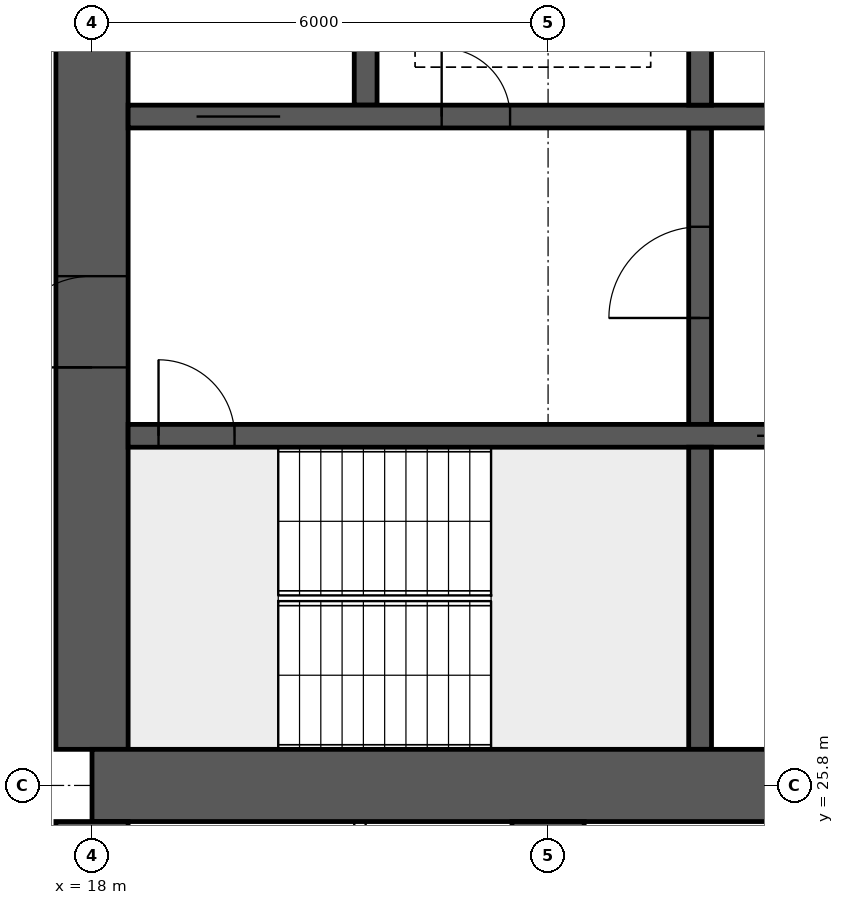
"""IFC4 building model, lengths in metres.
Left out: names, types, materials, properties, quantities, classifications, styles, units other than length and angle.
Written with IfcOpenShell. Run it as: python <this file> out.ifc"""

import sys

from ifc_helpers import new_model, si_unit, direction, frame, frame_2d, origin, place, context, subcontext, project, spatial, rectangle, extrude, element, fill, save


model = new_model("IFC4")
c1 = context("Model", 3, precision=1e-05, world=origin(), true_north=direction((0.0, 1.0)))
c2 = subcontext(c1, "Body", "Model", "MODEL_VIEW")
j1 = project(units=[si_unit("LENGTHUNIT", "METRE"), si_unit("PLANEANGLEUNIT", "RADIAN")], contexts=[c1])
p1 = place(None, origin())
s1 = spatial("IfcSite", under=j1, at=p1, CompositionType="ELEMENT")
p2 = place(p1, origin())
s2 = spatial("IfcBuilding", under=s1, at=p2, CompositionType="ELEMENT")
p3 = place(p2, frame((0.0, 0.0, 91.9)))
s3 = spatial("IfcBuildingStorey", under=s2, at=p3, CompositionType="ELEMENT", Elevation=91.9)
p4 = place(p3, frame((18.0, 25.8, 0.0), z_axis=(0.0, 0.0, 1.0), x_axis=(1.0, 0.0, 0.0)))
e1 = element("IfcWall", 1, at=p4, inside=s3, PredefinedType="SHEAR", context=c2, shape_type="SweptSolid", body=[
    extrude(rectangle(XDim=48.0, YDim=0.95, at=frame_2d((24.0, 0.0))), origin(), (0.0, 0.0, 1.0), 3.75),
])
p5 = place(p3, frame((18.0, 26.275, 0.0), z_axis=(0.0, 0.0, 1.0), x_axis=(0.0, 1.0, 0.0)))
e2 = element("IfcWall", 2, at=p5, inside=s3, PredefinedType="SHEAR", context=c2, shape_type="SweptSolid", body=[
    extrude(rectangle(XDim=11.45, YDim=0.95, at=frame_2d((5.725, 0.0))), origin(), (0.0, 0.0, 1.0), 3.75),
])
p6 = place(p5, frame((5.025, 0.0, 0.0)))
e3 = element("IfcOpeningElement", 3, at=p6, cuts=e2, PredefinedType="OPENING", context=c2, shape_type="SweptSolid", body=[
    extrude(rectangle(XDim=1.2, YDim=2.1, at=frame_2d((0.6, 1.05))), frame((0.0, 0.485, 0.0), z_axis=(0.0, -1.0, 0.0), x_axis=(1.0, 0.0, 0.0)), (0.0, 0.0, 1.0), 0.97),
])
p7 = place(p3, frame((18.475, 30.4, 0.0), z_axis=(0.0, 0.0, 1.0), x_axis=(1.0, 0.0, 0.0)))
e4 = element("IfcWall", 4, at=p7, inside=s3, PredefinedType="SHEAR", context=c2, shape_type="SweptSolid", body=[
    extrude(rectangle(XDim=47.05, YDim=0.3, at=frame_2d((23.525, 0.0))), origin(), (0.0, 0.0, 1.0), 3.75),
])
p8 = place(p7, frame((0.4, 0.0, 0.0)))
e5 = element("IfcOpeningElement", 5, at=p8, cuts=e4, PredefinedType="OPENING", context=c2, shape_type="SweptSolid", body=[
    extrude(rectangle(XDim=1.0, YDim=2.1, at=frame_2d((0.5, 1.05))), frame((0.0, 0.16, 0.0), z_axis=(0.0, -1.0, 0.0), x_axis=(1.0, 0.0, 0.0)), (0.0, 0.0, 1.0), 0.32),
])
p9 = place(p7, frame((45.65, 0.0, 0.0)))
e6 = element("IfcOpeningElement", 6, at=p9, cuts=e4, PredefinedType="OPENING", context=c2, shape_type="SweptSolid", body=[
    extrude(rectangle(XDim=1.0, YDim=2.1, at=frame_2d((0.5, 1.05))), frame((0.0, 0.16, 0.0), z_axis=(0.0, -1.0, 0.0), x_axis=(1.0, 0.0, 0.0)), (0.0, 0.0, 1.0), 0.32),
])
p10 = place(p7, frame((8.275, 0.0, 0.0)))
e7 = element("IfcOpeningElement", 7, at=p10, cuts=e4, PredefinedType="OPENING", context=c2, shape_type="SweptSolid", body=[
    extrude(rectangle(XDim=1.1, YDim=2.1, at=frame_2d((0.55, 1.05))), frame((0.0, 0.16, 0.0), z_axis=(0.0, -1.0, 0.0), x_axis=(1.0, 0.0, 0.0)), (0.0, 0.0, 1.0), 0.32),
])
p11 = place(p7, frame((10.875, 0.0, 0.0)))
e8 = element("IfcOpeningElement", 8, at=p11, cuts=e4, PredefinedType="OPENING", context=c2, shape_type="SweptSolid", body=[
    extrude(rectangle(XDim=1.1, YDim=2.1, at=frame_2d((0.55, 1.05))), frame((0.0, 0.16, 0.0), z_axis=(0.0, -1.0, 0.0), x_axis=(1.0, 0.0, 0.0)), (0.0, 0.0, 1.0), 0.32),
])
p12 = place(p7, frame((13.475, 0.0, 0.0)))
e9 = element("IfcOpeningElement", 9, at=p12, cuts=e4, PredefinedType="OPENING", context=c2, shape_type="SweptSolid", body=[
    extrude(rectangle(XDim=1.1, YDim=2.1, at=frame_2d((0.55, 1.05))), frame((0.0, 0.16, 0.0), z_axis=(0.0, -1.0, 0.0), x_axis=(1.0, 0.0, 0.0)), (0.0, 0.0, 1.0), 0.32),
])
p13 = place(p7, frame((16.075, 0.0, 0.0)))
e10 = element("IfcOpeningElement", 10, at=p13, cuts=e4, PredefinedType="OPENING", context=c2, shape_type="SweptSolid", body=[
    extrude(rectangle(XDim=1.1, YDim=2.1, at=frame_2d((0.55, 1.05))), frame((0.0, 0.16, 0.0), z_axis=(0.0, -1.0, 0.0), x_axis=(1.0, 0.0, 0.0)), (0.0, 0.0, 1.0), 0.32),
])
p14 = place(p7, frame((18.85, 0.0, 0.0)))
e11 = element("IfcOpeningElement", 11, at=p14, cuts=e4, PredefinedType="OPENING", context=c2, shape_type="SweptSolid", body=[
    extrude(rectangle(XDim=0.9, YDim=2.1, at=frame_2d((0.45, 1.05))), frame((0.0, 0.16, 0.0), z_axis=(0.0, -1.0, 0.0), x_axis=(1.0, 0.0, 0.0)), (0.0, 0.0, 1.0), 0.32),
])
p15 = place(p7, frame((30.142, 0.0, 0.0)))
e12 = element("IfcOpeningElement", 12, at=p15, cuts=e4, PredefinedType="OPENING", context=c2, shape_type="SweptSolid", body=[
    extrude(rectangle(XDim=1.1, YDim=2.1, at=frame_2d((0.55, 1.05))), frame((0.0, 0.16, 0.0), z_axis=(0.0, -1.0, 0.0), x_axis=(1.0, 0.0, 0.0)), (0.0, 0.0, 1.0), 0.32),
])
p16 = place(p7, frame((33.675, 0.0, 0.0)))
e13 = element("IfcOpeningElement", 13, at=p16, cuts=e4, PredefinedType="OPENING", context=c2, shape_type="SweptSolid", body=[
    extrude(rectangle(XDim=1.1, YDim=2.1, at=frame_2d((0.55, 1.05))), frame((0.0, 0.16, 0.0), z_axis=(0.0, -1.0, 0.0), x_axis=(1.0, 0.0, 0.0)), (0.0, 0.0, 1.0), 0.32),
])
p17 = place(p7, frame((37.208, 0.0, 0.0)))
e14 = element("IfcOpeningElement", 14, at=p17, cuts=e4, PredefinedType="OPENING", context=c2, shape_type="SweptSolid", body=[
    extrude(rectangle(XDim=1.1, YDim=2.1, at=frame_2d((0.55, 1.05))), frame((0.0, 0.16, 0.0), z_axis=(0.0, -1.0, 0.0), x_axis=(1.0, 0.0, 0.0)), (0.0, 0.0, 1.0), 0.32),
])
p18 = place(p3, frame((18.475, 34.6, 0.0), z_axis=(0.0, 0.0, 1.0), x_axis=(1.0, 0.0, 0.0)))
e15 = element("IfcWall", 15, at=p18, inside=s3, PredefinedType="SHEAR", context=c2, shape_type="SweptSolid", body=[
    extrude(rectangle(XDim=47.05, YDim=0.3, at=frame_2d((23.525, 0.0))), origin(), (0.0, 0.0, 1.0), 3.75),
])
p19 = place(p18, frame((0.9, 0.0, 0.0)))
e16 = element("IfcOpeningElement", 16, at=p19, cuts=e15, PredefinedType="OPENING", context=c2, shape_type="SweptSolid", body=[
    extrude(rectangle(XDim=1.1, YDim=2.1, at=frame_2d((0.55, 1.05))), frame((0.0, 0.16, 0.0), z_axis=(0.0, -1.0, 0.0), x_axis=(1.0, 0.0, 0.0)), (0.0, 0.0, 1.0), 0.32),
])
p20 = place(p18, frame((45.05, 0.0, 0.0)))
e17 = element("IfcOpeningElement", 17, at=p20, cuts=e15, PredefinedType="OPENING", context=c2, shape_type="SweptSolid", body=[
    extrude(rectangle(XDim=1.1, YDim=2.1, at=frame_2d((0.55, 1.05))), frame((0.0, 0.16, 0.0), z_axis=(0.0, -1.0, 0.0), x_axis=(1.0, 0.0, 0.0)), (0.0, 0.0, 1.0), 0.32),
])
p21 = place(p18, frame((4.125, 0.0, 0.0)))
e18 = element("IfcOpeningElement", 18, at=p21, cuts=e15, PredefinedType="OPENING", context=c2, shape_type="SweptSolid", body=[
    extrude(rectangle(XDim=0.9, YDim=2.1, at=frame_2d((0.45, 1.05))), frame((0.0, 0.16, 0.0), z_axis=(0.0, -1.0, 0.0), x_axis=(1.0, 0.0, 0.0)), (0.0, 0.0, 1.0), 0.32),
])
p22 = place(p18, frame((42.025, 0.0, 0.0)))
e19 = element("IfcOpeningElement", 19, at=p22, cuts=e15, PredefinedType="OPENING", context=c2, shape_type="SweptSolid", body=[
    extrude(rectangle(XDim=0.9, YDim=2.1, at=frame_2d((0.45, 1.05))), frame((0.0, 0.16, 0.0), z_axis=(0.0, -1.0, 0.0), x_axis=(1.0, 0.0, 0.0)), (0.0, 0.0, 1.0), 0.32),
])
p23 = place(p18, frame((8.9, 0.0, 0.0)))
e20 = element("IfcOpeningElement", 20, at=p23, cuts=e15, PredefinedType="OPENING", context=c2, shape_type="SweptSolid", body=[
    extrude(rectangle(XDim=0.9, YDim=2.1, at=frame_2d((0.45, 1.05))), frame((0.0, 0.16, 0.0), z_axis=(0.0, -1.0, 0.0), x_axis=(1.0, 0.0, 0.0)), (0.0, 0.0, 1.0), 0.32),
])
p24 = place(p18, frame((12.874, 0.0, 0.0)))
e21 = element("IfcOpeningElement", 21, at=p24, cuts=e15, PredefinedType="OPENING", context=c2, shape_type="SweptSolid", body=[
    extrude(rectangle(XDim=0.9, YDim=2.1, at=frame_2d((0.45, 1.05))), frame((0.0, 0.16, 0.0), z_axis=(0.0, -1.0, 0.0), x_axis=(1.0, 0.0, 0.0)), (0.0, 0.0, 1.0), 0.32),
])
p25 = place(p18, frame((16.521, 0.0, 0.0)))
e22 = element("IfcOpeningElement", 22, at=p25, cuts=e15, PredefinedType="OPENING", context=c2, shape_type="SweptSolid", body=[
    extrude(rectangle(XDim=0.9, YDim=2.1, at=frame_2d((0.45, 1.05))), frame((0.0, 0.16, 0.0), z_axis=(0.0, -1.0, 0.0), x_axis=(1.0, 0.0, 0.0)), (0.0, 0.0, 1.0), 0.32),
])
p26 = place(p18, frame((20.28, 0.0, 0.0)))
e23 = element("IfcOpeningElement", 23, at=p26, cuts=e15, PredefinedType="OPENING", context=c2, shape_type="SweptSolid", body=[
    extrude(rectangle(XDim=0.9, YDim=2.1, at=frame_2d((0.45, 1.05))), frame((0.0, 0.16, 0.0), z_axis=(0.0, -1.0, 0.0), x_axis=(1.0, 0.0, 0.0)), (0.0, 0.0, 1.0), 0.32),
])
p27 = place(p18, frame((24.686, 0.0, 0.0)))
e24 = element("IfcOpeningElement", 24, at=p27, cuts=e15, PredefinedType="OPENING", context=c2, shape_type="SweptSolid", body=[
    extrude(rectangle(XDim=0.9, YDim=2.1, at=frame_2d((0.45, 1.05))), frame((0.0, 0.16, 0.0), z_axis=(0.0, -1.0, 0.0), x_axis=(1.0, 0.0, 0.0)), (0.0, 0.0, 1.0), 0.32),
])
p28 = place(p18, frame((27.483, 0.0, 0.0)))
e25 = element("IfcOpeningElement", 25, at=p28, cuts=e15, PredefinedType="OPENING", context=c2, shape_type="SweptSolid", body=[
    extrude(rectangle(XDim=0.9, YDim=2.1, at=frame_2d((0.45, 1.05))), frame((0.0, 0.16, 0.0), z_axis=(0.0, -1.0, 0.0), x_axis=(1.0, 0.0, 0.0)), (0.0, 0.0, 1.0), 0.32),
])
p29 = place(p18, frame((30.666, 0.0, 0.0)))
e26 = element("IfcOpeningElement", 26, at=p29, cuts=e15, PredefinedType="OPENING", context=c2, shape_type="SweptSolid", body=[
    extrude(rectangle(XDim=0.9, YDim=2.1, at=frame_2d((0.45, 1.05))), frame((0.0, 0.16, 0.0), z_axis=(0.0, -1.0, 0.0), x_axis=(1.0, 0.0, 0.0)), (0.0, 0.0, 1.0), 0.32),
])
p30 = place(p18, frame((34.617, 0.0, 0.0)))
e27 = element("IfcOpeningElement", 27, at=p30, cuts=e15, PredefinedType="OPENING", context=c2, shape_type="SweptSolid", body=[
    extrude(rectangle(XDim=0.9, YDim=2.1, at=frame_2d((0.45, 1.05))), frame((0.0, 0.16, 0.0), z_axis=(0.0, -1.0, 0.0), x_axis=(1.0, 0.0, 0.0)), (0.0, 0.0, 1.0), 0.32),
])
p31 = place(p18, frame((37.555, 0.0, 0.0)))
e28 = element("IfcOpeningElement", 28, at=p31, cuts=e15, PredefinedType="OPENING", context=c2, shape_type="SweptSolid", body=[
    extrude(rectangle(XDim=0.9, YDim=2.1, at=frame_2d((0.45, 1.05))), frame((0.0, 0.16, 0.0), z_axis=(0.0, -1.0, 0.0), x_axis=(1.0, 0.0, 0.0)), (0.0, 0.0, 1.0), 0.32),
])
p32 = place(p3, frame((26.0, 26.275, 0.0), z_axis=(0.0, 0.0, 1.0), x_axis=(0.0, 1.0, 0.0)))
e29 = element("IfcWall", 29, at=p32, inside=s3, PredefinedType="SHEAR", context=c2, shape_type="SweptSolid", body=[
    extrude(rectangle(XDim=3.975, YDim=0.3, at=frame_2d((1.988, 0.0))), origin(), (0.0, 0.0, 1.0), 3.75),
])
p33 = place(p3, frame((26.0, 30.55, 0.0), z_axis=(0.0, 0.0, 1.0), x_axis=(0.0, 1.0, 0.0)))
e30 = element("IfcWall", 30, at=p33, inside=s3, PredefinedType="SHEAR", context=c2, shape_type="SweptSolid", body=[
    extrude(rectangle(XDim=3.9, YDim=0.3, at=frame_2d((1.95, 0.0))), origin(), (0.0, 0.0, 1.0), 3.75),
])
p34 = place(p33, frame((1.4, 0.0, 0.0)))
e31 = element("IfcOpeningElement", 31, at=p34, cuts=e30, PredefinedType="OPENING", context=c2, shape_type="SweptSolid", body=[
    extrude(rectangle(XDim=1.2, YDim=2.1, at=frame_2d((0.6, 1.05))), frame((0.0, 0.16, 0.0), z_axis=(0.0, -1.0, 0.0), x_axis=(1.0, 0.0, 0.0)), (0.0, 0.0, 1.0), 0.32),
])
for number, where, z_axis, x_axis in (
    (32, (21.6, 34.75, 0.0), (0.0, 0.0, 1.0), (0.0, 1.0, 0.0)),
    (33, (26.0, 34.75, 0.0), (0.0, 0.0, 1.0), (0.0, 1.0, 0.0)),
):
    element("IfcWall", number, at=place(p3, frame(where, z_axis=z_axis, x_axis=x_axis)), inside=s3, PredefinedType="SHEAR", context=c2, shape_type="SweptSolid", body=[
        extrude(rectangle(XDim=2.975, YDim=0.3, at=frame_2d((1.488, 0.0))), origin(), (0.0, 0.0, 1.0), 3.75),
    ])
for number, where, z_axis, x_axis in (
    (34, (18.0, 16.0, 0.0), (0.0, 0.0, 1.0), (0.0, 1.0, 0.0)),
    (35, (24.0, 16.0, 0.0), (0.0, 0.0, 1.0), (0.0, 1.0, 0.0)),
):
    element("IfcWall", number, at=place(p3, frame(where, z_axis=z_axis, x_axis=x_axis)), inside=s3, PredefinedType="SHEAR", context=c2, shape_type="SweptSolid", body=[
        extrude(rectangle(XDim=9.325, YDim=0.95, at=frame_2d((4.663, 0.0))), origin(), (0.0, 0.0, 1.0), 3.75),
    ])
p35 = place(p3, frame((21.525, 16.1, 0.0), z_axis=(0.0, 0.0, 1.0), x_axis=(0.0, 1.0, 0.0)))
e36 = element("IfcWall", 36, at=p35, inside=s3, PredefinedType="PARTITIONING", context=c2, shape_type="SweptSolid", body=[
    extrude(rectangle(XDim=9.225, YDim=0.15, at=frame_2d((4.612, 0.0))), origin(), (0.0, 0.0, 1.0), 3.5),
])
p36 = place(p6, origin())
e37 = element("IfcDoor", 37, at=p36, inside=s3, OperationType="SINGLE_SWING_LEFT", PredefinedType="DOOR", context=c2, shape_type="SweptSolid", body=[
    extrude(rectangle(XDim=1.2, YDim=2.1, at=frame_2d((0.6, 1.05))), frame((0.0, 0.025, 0.0), z_axis=(0.0, -1.0, 0.0), x_axis=(1.0, 0.0, 0.0)), (0.0, 0.0, 1.0), 0.05),
])
fill(e3, e37)
p37 = place(p8, origin())
e38 = element("IfcDoor", 38, at=p37, inside=s3, OperationType="SINGLE_SWING_LEFT", PredefinedType="DOOR", context=c2, shape_type="SweptSolid", body=[
    extrude(rectangle(XDim=1.0, YDim=2.1, at=frame_2d((0.5, 1.05))), frame((0.0, 0.025, 0.0), z_axis=(0.0, -1.0, 0.0), x_axis=(1.0, 0.0, 0.0)), (0.0, 0.0, 1.0), 0.05),
])
fill(e5, e38)
p38 = place(p19, origin())
e39 = element("IfcDoor", 39, at=p38, inside=s3, OperationType="DOUBLE_DOOR_SLIDING", PredefinedType="DOOR", context=c2, shape_type="SweptSolid", body=[
    extrude(rectangle(XDim=1.1, YDim=2.1, at=frame_2d((0.55, 1.05))), frame((0.0, 0.025, 0.0), z_axis=(0.0, -1.0, 0.0), x_axis=(1.0, 0.0, 0.0)), (0.0, 0.0, 1.0), 0.05),
])
fill(e16, e39)
p39 = place(p21, origin())
e40 = element("IfcDoor", 40, at=p39, inside=s3, OperationType="SINGLE_SWING_LEFT", PredefinedType="DOOR", context=c2, shape_type="SweptSolid", body=[
    extrude(rectangle(XDim=0.9, YDim=2.1, at=frame_2d((0.45, 1.05))), frame((0.0, 0.025, 0.0), z_axis=(0.0, -1.0, 0.0), x_axis=(1.0, 0.0, 0.0)), (0.0, 0.0, 1.0), 0.05),
])
fill(e18, e40)
p40 = place(p34, origin())
e41 = element("IfcDoor", 41, at=p40, inside=s3, OperationType="SINGLE_SWING_LEFT", PredefinedType="DOOR", context=c2, shape_type="SweptSolid", body=[
    extrude(rectangle(XDim=1.2, YDim=2.1, at=frame_2d((0.6, 1.05))), frame((0.0, 0.025, 0.0), z_axis=(0.0, -1.0, 0.0), x_axis=(1.0, 0.0, 0.0)), (0.0, 0.0, 1.0), 0.05),
])
fill(e31, e41)
p41 = place(p10, origin())
e42 = element("IfcDoor", 42, at=p41, inside=s3, OperationType="DOUBLE_DOOR_SLIDING", PredefinedType="DOOR", context=c2, shape_type="SweptSolid", body=[
    extrude(rectangle(XDim=1.1, YDim=2.1, at=frame_2d((0.55, 1.05))), frame((0.0, 0.025, 0.0), z_axis=(0.0, -1.0, 0.0), x_axis=(1.0, 0.0, 0.0)), (0.0, 0.0, 1.0), 0.05),
])
fill(e7, e42)
save(model, sys.argv[1])
